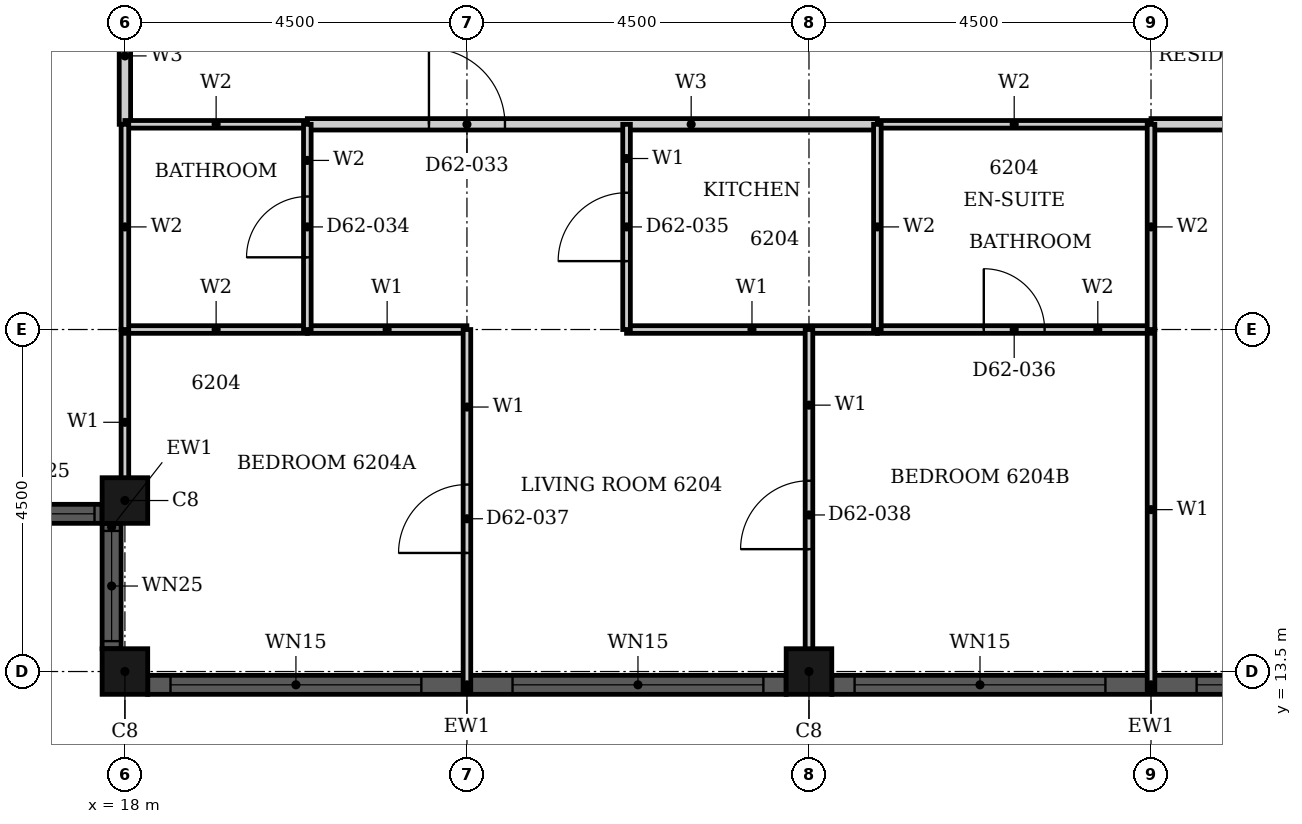
"""IFC4 building model, lengths in metres.
Left out: names, types, materials, properties, quantities, classifications, styles, units other than length and angle.
Written with IfcOpenShell. Run it as: python <this file> out.ifc"""

import sys

from ifc_helpers import new_model, si_unit, direction, frame, frame_2d, origin, origin_2d, place, context, subcontext, project, spatial, rectangle, hollow_rectangle, extrude, element, fill, save


model = new_model("IFC4")
c1 = context("Model", 3, precision=1e-05, world=origin(), true_north=direction((0.0, 1.0)))
c2 = subcontext(c1, "Body", "Model", "MODEL_VIEW")
j1 = project(units=[si_unit("LENGTHUNIT", "METRE"), si_unit("PLANEANGLEUNIT", "RADIAN")], contexts=[c1])
p1 = place(None, origin())
s1 = spatial("IfcSite", under=j1, at=p1, CompositionType="ELEMENT")
p2 = place(p1, origin())
s2 = spatial("IfcBuilding", under=s1, at=p2, CompositionType="ELEMENT")
p3 = place(p2, frame((0.0, 0.0, 245.3)))
s3 = spatial("IfcBuildingStorey", under=s2, at=p3, CompositionType="ELEMENT", Elevation=245.3)
for number, where, z_axis, x_axis in (
    (1, (18.0, 15.75, 0.0), (0.0, 0.0, 1.0), (1.0, 0.0, 0.0)),
    (2, (18.0, 13.5, 0.0), (0.0, 0.0, 1.0), (1.0, 0.0, 0.0)),
    (3, (27.0, 13.5, 0.0), (0.0, 0.0, 1.0), (1.0, 0.0, 0.0)),
):
    element("IfcColumn", number, at=place(p3, frame(where, z_axis=z_axis, x_axis=x_axis)), inside=s3, PredefinedType="COLUMN", context=c2, shape_type="SweptSolid", body=[
        extrude(hollow_rectangle(XDim=0.6, YDim=0.6, WallThickness=0.02, at=origin_2d()), origin(), (0.0, 0.0, 1.0), 3.7),
    ])
p4 = place(p3, frame((16.05, 15.575, 0.0), z_axis=(0.0, 0.0, 1.0), x_axis=(1.0, 0.0, 0.0)))
e4 = element("IfcWall", 4, at=p4, inside=s3, PredefinedType="SOLIDWALL", context=c2, shape_type="SweptSolid", body=[
    extrude(rectangle(XDim=1.65, YDim=0.25, at=frame_2d((0.825, 0.0))), origin(), (0.0, 0.0, 1.0), 3.7),
])
p5 = place(p4, frame((0.1, 0.0, 0.9)))
e5 = element("IfcOpeningElement", 5, at=p5, cuts=e4, PredefinedType="OPENING", context=c2, shape_type="SweptSolid", body=[
    extrude(rectangle(XDim=1.45, YDim=1.85, at=frame_2d((0.725, 0.925))), frame((0.0, 0.135, 0.0), z_axis=(0.0, -1.0, 0.0), x_axis=(1.0, 0.0, 0.0)), (0.0, 0.0, 1.0), 0.27),
])
p6 = place(p3, frame((17.825, 15.45, 0.0), z_axis=(0.0, 0.0, 1.0), x_axis=(0.0, -1.0, 0.0)))
e6 = element("IfcWall", 6, at=p6, inside=s3, PredefinedType="SOLIDWALL", context=c2, shape_type="SweptSolid", body=[
    extrude(rectangle(XDim=1.65, YDim=0.25, at=frame_2d((0.825, 0.0))), origin(), (0.0, 0.0, 1.0), 3.7),
])
p7 = place(p6, frame((0.1, 0.0, 0.9)))
e7 = element("IfcOpeningElement", 7, at=p7, cuts=e6, PredefinedType="OPENING", context=c2, shape_type="SweptSolid", body=[
    extrude(rectangle(XDim=1.45, YDim=1.85, at=frame_2d((0.725, 0.925))), frame((0.0, 0.135, 0.0), z_axis=(0.0, -1.0, 0.0), x_axis=(1.0, 0.0, 0.0)), (0.0, 0.0, 1.0), 0.27),
])
p8 = place(p3, frame((18.3, 13.325, 0.0), z_axis=(0.0, 0.0, 1.0), x_axis=(1.0, 0.0, 0.0)))
e8 = element("IfcWall", 8, at=p8, inside=s3, PredefinedType="SOLIDWALL", context=c2, shape_type="SweptSolid", body=[
    extrude(rectangle(XDim=8.4, YDim=0.25, at=frame_2d((4.2, 0.0))), origin(), (0.0, 0.0, 1.0), 3.7),
])
p9 = place(p8, frame((0.3, 0.0, 0.45)))
e9 = element("IfcOpeningElement", 9, at=p9, cuts=e8, PredefinedType="OPENING", context=c2, shape_type="SweptSolid", body=[
    extrude(rectangle(XDim=3.3, YDim=2.3, at=frame_2d((1.65, 1.15))), frame((0.0, 0.135, 0.0), z_axis=(0.0, -1.0, 0.0), x_axis=(1.0, 0.0, 0.0)), (0.0, 0.0, 1.0), 0.27),
])
p10 = place(p8, frame((4.8, 0.0, 0.45)))
e10 = element("IfcOpeningElement", 10, at=p10, cuts=e8, PredefinedType="OPENING", context=c2, shape_type="SweptSolid", body=[
    extrude(rectangle(XDim=3.3, YDim=2.3, at=frame_2d((1.65, 1.15))), frame((0.0, 0.135, 0.0), z_axis=(0.0, -1.0, 0.0), x_axis=(1.0, 0.0, 0.0)), (0.0, 0.0, 1.0), 0.27),
])
p11 = place(p3, frame((27.3, 13.325, 0.0), z_axis=(0.0, 0.0, 1.0), x_axis=(1.0, 0.0, 0.0)))
e11 = element("IfcWall", 11, at=p11, inside=s3, PredefinedType="SOLIDWALL", context=c2, shape_type="SweptSolid", body=[
    extrude(rectangle(XDim=8.4, YDim=0.25, at=frame_2d((4.2, 0.0))), origin(), (0.0, 0.0, 1.0), 3.7),
])
p12 = place(p11, frame((0.3, 0.0, 0.45)))
e12 = element("IfcOpeningElement", 12, at=p12, cuts=e11, PredefinedType="OPENING", context=c2, shape_type="SweptSolid", body=[
    extrude(rectangle(XDim=3.3, YDim=2.3, at=frame_2d((1.65, 1.15))), frame((0.0, 0.135, 0.0), z_axis=(0.0, -1.0, 0.0), x_axis=(1.0, 0.0, 0.0)), (0.0, 0.0, 1.0), 0.27),
])
p13 = place(p11, frame((4.8, 0.0, 0.45)))
e13 = element("IfcOpeningElement", 13, at=p13, cuts=e11, PredefinedType="OPENING", context=c2, shape_type="SweptSolid", body=[
    extrude(rectangle(XDim=3.3, YDim=2.3, at=frame_2d((1.65, 1.15))), frame((0.0, 0.135, 0.0), z_axis=(0.0, -1.0, 0.0), x_axis=(1.0, 0.0, 0.0)), (0.0, 0.0, 1.0), 0.27),
])
p14 = place(p3, frame((20.4, 20.7, 0.0), z_axis=(0.0, 0.0, 1.0), x_axis=(1.0, 0.0, 0.0)))
e14 = element("IfcWall", 14, at=p14, inside=s3, PredefinedType="PARTITIONING", context=c2, shape_type="SweptSolid", body=[
    extrude(rectangle(XDim=7.5, YDim=0.15, at=frame_2d((3.75, 0.0))), origin(), (0.0, 0.0, 1.0), 3.4),
])
p15 = place(p14, frame((1.6, 0.0, 0.0)))
e15 = element("IfcOpeningElement", 15, at=p15, cuts=e14, PredefinedType="OPENING", context=c2, shape_type="SweptSolid", body=[
    extrude(rectangle(XDim=1.0, YDim=2.2, at=frame_2d((0.5, 1.1))), frame((0.0, 0.085, 0.0), z_axis=(0.0, -1.0, 0.0), x_axis=(1.0, 0.0, 0.0)), (0.0, 0.0, 1.0), 0.17),
])
p16 = place(p3, frame((31.5, 20.7, 0.0), z_axis=(0.0, 0.0, 1.0), x_axis=(1.0, 0.0, 0.0)))
e16 = element("IfcWall", 16, at=p16, inside=s3, PredefinedType="PARTITIONING", context=c2, shape_type="SweptSolid", body=[
    extrude(rectangle(XDim=18.05, YDim=0.15, at=frame_2d((9.025, 0.0))), origin(), (0.0, 0.0, 1.0), 3.4),
])
p17 = place(p16, frame((6.25, 0.0, 0.0)))
e17 = element("IfcOpeningElement", 17, at=p17, cuts=e16, PredefinedType="OPENING", context=c2, shape_type="SweptSolid", body=[
    extrude(rectangle(XDim=1.0, YDim=2.1, at=frame_2d((0.5, 1.05))), frame((0.0, 0.085, 0.0), z_axis=(0.0, -1.0, 0.0), x_axis=(1.0, 0.0, 0.0)), (0.0, 0.0, 1.0), 0.17),
])
p18 = place(p3, frame((18.0, 20.7, 0.0), z_axis=(0.0, 0.0, 1.0), x_axis=(0.0, 1.0, 0.0)))
e18 = element("IfcWall", 18, at=p18, inside=s3, PredefinedType="PARTITIONING", context=c2, shape_type="SweptSolid", body=[
    extrude(rectangle(XDim=1.8, YDim=0.15, at=frame_2d((0.9, 0.0))), origin(), (0.0, 0.0, 1.0), 3.4),
])
p19 = place(p3, frame((20.4, 18.0, 0.0), z_axis=(0.0, 0.0, 1.0), x_axis=(1.0, 0.0, 0.0)))
e19 = element("IfcWall", 19, at=p19, inside=s3, PredefinedType="PARTITIONING", context=c2, shape_type="SweptSolid", body=[
    extrude(rectangle(XDim=2.1, YDim=0.1, at=frame_2d((1.05, 0.0))), origin(), (0.0, 0.0, 1.0), 3.4),
])
p20 = place(p3, frame((24.6, 18.0, 0.0), z_axis=(0.0, 0.0, 1.0), x_axis=(1.0, 0.0, 0.0)))
e20 = element("IfcWall", 20, at=p20, inside=s3, PredefinedType="PARTITIONING", context=c2, shape_type="SweptSolid", body=[
    extrude(rectangle(XDim=3.3, YDim=0.1, at=frame_2d((1.65, 0.0))), origin(), (0.0, 0.0, 1.0), 3.4),
])
p21 = place(p3, frame((18.0, 15.56, 0.0), z_axis=(0.0, 0.0, 1.0), x_axis=(0.0, 1.0, 0.0)))
e21 = element("IfcWall", 21, at=p21, inside=s3, PredefinedType="PARTITIONING", context=c2, shape_type="SweptSolid", body=[
    extrude(rectangle(XDim=2.439, YDim=0.1, at=frame_2d((1.219, 0.0))), origin(), (0.0, 0.0, 1.0), 3.4),
])
p22 = place(p3, frame((22.5, 13.26, 0.0), z_axis=(0.0, 0.0, 1.0), x_axis=(0.0, 1.0, 0.0)))
e22 = element("IfcWall", 22, at=p22, inside=s3, PredefinedType="PARTITIONING", context=c2, shape_type="SweptSolid", body=[
    extrude(rectangle(XDim=4.74, YDim=0.1, at=frame_2d((2.37, 0.0))), origin(), (0.0, 0.0, 1.0), 3.4),
])
p23 = place(p22, frame((1.8, 0.0, 0.0)))
e23 = element("IfcOpeningElement", 23, at=p23, cuts=e22, PredefinedType="OPENING", context=c2, shape_type="SweptSolid", body=[
    extrude(rectangle(XDim=0.9, YDim=2.1, at=frame_2d((0.45, 1.05))), frame((0.0, 0.06, 0.0), z_axis=(0.0, -1.0, 0.0), x_axis=(1.0, 0.0, 0.0)), (0.0, 0.0, 1.0), 0.12),
])
p24 = place(p3, frame((24.6, 18.0, 0.0), z_axis=(0.0, 0.0, 1.0), x_axis=(0.0, 1.0, 0.0)))
e24 = element("IfcWall", 24, at=p24, inside=s3, PredefinedType="PARTITIONING", context=c2, shape_type="SweptSolid", body=[
    extrude(rectangle(XDim=2.7, YDim=0.1, at=frame_2d((1.35, 0.0))), origin(), (0.0, 0.0, 1.0), 3.4),
])
p25 = place(p24, frame((0.9, 0.0, 0.0)))
e25 = element("IfcOpeningElement", 25, at=p25, cuts=e24, PredefinedType="OPENING", context=c2, shape_type="SweptSolid", body=[
    extrude(rectangle(XDim=0.9, YDim=2.1, at=frame_2d((0.45, 1.05))), frame((0.0, 0.06, 0.0), z_axis=(0.0, -1.0, 0.0), x_axis=(1.0, 0.0, 0.0)), (0.0, 0.0, 1.0), 0.12),
])
p26 = place(p3, frame((27.0, 13.31, 0.0), z_axis=(0.0, 0.0, 1.0), x_axis=(0.0, 1.0, 0.0)))
e26 = element("IfcWall", 26, at=p26, inside=s3, PredefinedType="PARTITIONING", context=c2, shape_type="SweptSolid", body=[
    extrude(rectangle(XDim=4.69, YDim=0.1, at=frame_2d((2.345, 0.0))), origin(), (0.0, 0.0, 1.0), 3.4),
])
p27 = place(p26, frame((1.8, 0.0, 0.0)))
e27 = element("IfcOpeningElement", 27, at=p27, cuts=e26, PredefinedType="OPENING", context=c2, shape_type="SweptSolid", body=[
    extrude(rectangle(XDim=0.9, YDim=2.1, at=frame_2d((0.45, 1.05))), frame((0.0, 0.06, 0.0), z_axis=(0.0, -1.0, 0.0), x_axis=(1.0, 0.0, 0.0)), (0.0, 0.0, 1.0), 0.12),
])
p28 = place(p3, frame((31.5, 13.26, 0.0), z_axis=(0.0, 0.0, 1.0), x_axis=(0.0, 1.0, 0.0)))
e28 = element("IfcWall", 28, at=p28, inside=s3, PredefinedType="PARTITIONING", context=c2, shape_type="SweptSolid", body=[
    extrude(rectangle(XDim=4.74, YDim=0.1, at=frame_2d((2.37, 0.0))), origin(), (0.0, 0.0, 1.0), 3.4),
])
p29 = place(p3, frame((18.0, 18.0, 0.0), z_axis=(0.0, 0.0, 1.0), x_axis=(1.0, 0.0, 0.0)))
e29 = element("IfcWall", 29, at=p29, inside=s3, PredefinedType="PARTITIONING", context=c2, shape_type="SweptSolid", body=[
    extrude(rectangle(XDim=2.4, YDim=0.1, at=frame_2d((1.2, 0.0))), origin(), (0.0, 0.0, 1.0), 3.4),
])
p30 = place(p3, frame((27.9, 18.0, 0.0), z_axis=(0.0, 0.0, 1.0), x_axis=(1.0, 0.0, 0.0)))
e30 = element("IfcWall", 30, at=p30, inside=s3, PredefinedType="PARTITIONING", context=c2, shape_type="SweptSolid", body=[
    extrude(rectangle(XDim=3.6, YDim=0.1, at=frame_2d((1.8, 0.0))), origin(), (0.0, 0.0, 1.0), 3.4),
])
p31 = place(p30, frame((1.4, 0.0, 0.0)))
e31 = element("IfcOpeningElement", 31, at=p31, cuts=e30, PredefinedType="OPENING", context=c2, shape_type="SweptSolid", body=[
    extrude(rectangle(XDim=0.8, YDim=2.1, at=frame_2d((0.4, 1.05))), frame((0.0, 0.06, 0.0), z_axis=(0.0, -1.0, 0.0), x_axis=(1.0, 0.0, 0.0)), (0.0, 0.0, 1.0), 0.12),
])
p32 = place(p3, frame((18.0, 20.7, 0.0), z_axis=(0.0, 0.0, 1.0), x_axis=(1.0, 0.0, 0.0)))
e32 = element("IfcWall", 32, at=p32, inside=s3, PredefinedType="PARTITIONING", context=c2, shape_type="SweptSolid", body=[
    extrude(rectangle(XDim=2.4, YDim=0.1, at=frame_2d((1.2, 0.0))), origin(), (0.0, 0.0, 1.0), 3.4),
])
p33 = place(p3, frame((27.9, 20.7, 0.0), z_axis=(0.0, 0.0, 1.0), x_axis=(1.0, 0.0, 0.0)))
e33 = element("IfcWall", 33, at=p33, inside=s3, PredefinedType="PARTITIONING", context=c2, shape_type="SweptSolid", body=[
    extrude(rectangle(XDim=3.6, YDim=0.1, at=frame_2d((1.8, 0.0))), origin(), (0.0, 0.0, 1.0), 3.4),
])
p34 = place(p3, frame((18.0, 18.0, 0.0), z_axis=(0.0, 0.0, 1.0), x_axis=(0.0, 1.0, 0.0)))
e34 = element("IfcWall", 34, at=p34, inside=s3, PredefinedType="PARTITIONING", context=c2, shape_type="SweptSolid", body=[
    extrude(rectangle(XDim=2.7, YDim=0.1, at=frame_2d((1.35, 0.0))), origin(), (0.0, 0.0, 1.0), 3.4),
])
p35 = place(p3, frame((20.4, 18.0, 0.0), z_axis=(0.0, 0.0, 1.0), x_axis=(0.0, 1.0, 0.0)))
e35 = element("IfcWall", 35, at=p35, inside=s3, PredefinedType="PARTITIONING", context=c2, shape_type="SweptSolid", body=[
    extrude(rectangle(XDim=2.7, YDim=0.1, at=frame_2d((1.35, 0.0))), origin(), (0.0, 0.0, 1.0), 3.4),
])
p36 = place(p35, frame((0.95, 0.0, 0.0)))
e36 = element("IfcOpeningElement", 36, at=p36, cuts=e35, PredefinedType="OPENING", context=c2, shape_type="SweptSolid", body=[
    extrude(rectangle(XDim=0.8, YDim=2.1, at=frame_2d((0.4, 1.05))), frame((0.0, 0.06, 0.0), z_axis=(0.0, -1.0, 0.0), x_axis=(1.0, 0.0, 0.0)), (0.0, 0.0, 1.0), 0.12),
])
for number, where, z_axis, x_axis in (
    (37, (27.9, 18.0, 0.0), (0.0, 0.0, 1.0), (0.0, 1.0, 0.0)),
    (38, (31.5, 18.0, 0.0), (0.0, 0.0, 1.0), (0.0, 1.0, 0.0)),
):
    element("IfcWall", number, at=place(p3, frame(where, z_axis=z_axis, x_axis=x_axis)), inside=s3, PredefinedType="PARTITIONING", context=c2, shape_type="SweptSolid", body=[
        extrude(rectangle(XDim=2.7, YDim=0.1, at=frame_2d((1.35, 0.0))), origin(), (0.0, 0.0, 1.0), 3.4),
    ])
p37 = place(p5, origin())
e39 = element("IfcWindow", 39, at=p37, inside=s3, PartitioningType="SINGLE_PANEL", PredefinedType="WINDOW", context=c2, shape_type="SweptSolid", body=[
    extrude(rectangle(XDim=1.45, YDim=1.85, at=frame_2d((0.725, 0.925))), frame((0.0, 0.03, 0.0), z_axis=(0.0, -1.0, 0.0), x_axis=(1.0, 0.0, 0.0)), (0.0, 0.0, 1.0), 0.06),
])
fill(e5, e39)
p38 = place(p7, origin())
e40 = element("IfcWindow", 40, at=p38, inside=s3, PartitioningType="SINGLE_PANEL", PredefinedType="WINDOW", context=c2, shape_type="SweptSolid", body=[
    extrude(rectangle(XDim=1.45, YDim=1.85, at=frame_2d((0.725, 0.925))), frame((0.0, 0.03, 0.0), z_axis=(0.0, -1.0, 0.0), x_axis=(1.0, 0.0, 0.0)), (0.0, 0.0, 1.0), 0.06),
])
fill(e7, e40)
p39 = place(p9, origin())
e41 = element("IfcWindow", 41, at=p39, inside=s3, PartitioningType="SINGLE_PANEL", PredefinedType="WINDOW", context=c2, shape_type="SweptSolid", body=[
    extrude(rectangle(XDim=3.3, YDim=2.3, at=frame_2d((1.65, 1.15))), frame((0.0, 0.03, 0.0), z_axis=(0.0, -1.0, 0.0), x_axis=(1.0, 0.0, 0.0)), (0.0, 0.0, 1.0), 0.06),
])
fill(e9, e41)
p40 = place(p10, origin())
e42 = element("IfcWindow", 42, at=p40, inside=s3, PartitioningType="SINGLE_PANEL", PredefinedType="WINDOW", context=c2, shape_type="SweptSolid", body=[
    extrude(rectangle(XDim=3.3, YDim=2.3, at=frame_2d((1.65, 1.15))), frame((0.0, 0.03, 0.0), z_axis=(0.0, -1.0, 0.0), x_axis=(1.0, 0.0, 0.0)), (0.0, 0.0, 1.0), 0.06),
])
fill(e10, e42)
p41 = place(p12, origin())
e43 = element("IfcWindow", 43, at=p41, inside=s3, PartitioningType="SINGLE_PANEL", PredefinedType="WINDOW", context=c2, shape_type="SweptSolid", body=[
    extrude(rectangle(XDim=3.3, YDim=2.3, at=frame_2d((1.65, 1.15))), frame((0.0, 0.03, 0.0), z_axis=(0.0, -1.0, 0.0), x_axis=(1.0, 0.0, 0.0)), (0.0, 0.0, 1.0), 0.06),
])
fill(e12, e43)
p42 = place(p13, origin())
e44 = element("IfcWindow", 44, at=p42, inside=s3, PartitioningType="SINGLE_PANEL", PredefinedType="WINDOW", context=c2, shape_type="SweptSolid", body=[
    extrude(rectangle(XDim=3.3, YDim=2.3, at=frame_2d((1.65, 1.15))), frame((0.0, 0.03, 0.0), z_axis=(0.0, -1.0, 0.0), x_axis=(1.0, 0.0, 0.0)), (0.0, 0.0, 1.0), 0.06),
])
fill(e13, e44)
p43 = place(p15, origin())
e45 = element("IfcDoor", 45, at=p43, inside=s3, OperationType="SINGLE_SWING_RIGHT", PredefinedType="DOOR", context=c2, shape_type="SweptSolid", body=[
    extrude(rectangle(XDim=1.0, YDim=2.2, at=frame_2d((0.5, 1.1))), frame((0.0, 0.025, 0.0), z_axis=(0.0, -1.0, 0.0), x_axis=(1.0, 0.0, 0.0)), (0.0, 0.0, 1.0), 0.05),
])
fill(e15, e45)
p44 = place(p36, origin())
e46 = element("IfcDoor", 46, at=p44, inside=s3, OperationType="SINGLE_SWING_LEFT", PredefinedType="DOOR", context=c2, shape_type="SweptSolid", body=[
    extrude(rectangle(XDim=0.8, YDim=2.1, at=frame_2d((0.4, 1.05))), frame((0.0, 0.025, 0.0), z_axis=(0.0, -1.0, 0.0), x_axis=(1.0, 0.0, 0.0)), (0.0, 0.0, 1.0), 0.05),
])
fill(e36, e46)
p45 = place(p25, origin())
e47 = element("IfcDoor", 47, at=p45, inside=s3, OperationType="SINGLE_SWING_LEFT", PredefinedType="DOOR", context=c2, shape_type="SweptSolid", body=[
    extrude(rectangle(XDim=0.9, YDim=2.1, at=frame_2d((0.45, 1.05))), frame((0.0, 0.025, 0.0), z_axis=(0.0, -1.0, 0.0), x_axis=(1.0, 0.0, 0.0)), (0.0, 0.0, 1.0), 0.05),
])
fill(e25, e47)
p46 = place(p31, origin())
e48 = element("IfcDoor", 48, at=p46, inside=s3, OperationType="SINGLE_SWING_RIGHT", PredefinedType="DOOR", context=c2, shape_type="SweptSolid", body=[
    extrude(rectangle(XDim=0.8, YDim=2.1, at=frame_2d((0.4, 1.05))), frame((0.0, 0.025, 0.0), z_axis=(0.0, -1.0, 0.0), x_axis=(1.0, 0.0, 0.0)), (0.0, 0.0, 1.0), 0.05),
])
fill(e31, e48)
p47 = place(p23, origin())
e49 = element("IfcDoor", 49, at=p47, inside=s3, OperationType="SINGLE_SWING_RIGHT", PredefinedType="DOOR", context=c2, shape_type="SweptSolid", body=[
    extrude(rectangle(XDim=0.9, YDim=2.1, at=frame_2d((0.45, 1.05))), frame((0.0, 0.025, 0.0), z_axis=(0.0, -1.0, 0.0), x_axis=(1.0, 0.0, 0.0)), (0.0, 0.0, 1.0), 0.05),
])
fill(e23, e49)
p48 = place(p27, origin())
e50 = element("IfcDoor", 50, at=p48, inside=s3, OperationType="SINGLE_SWING_LEFT", PredefinedType="DOOR", context=c2, shape_type="SweptSolid", body=[
    extrude(rectangle(XDim=0.9, YDim=2.1, at=frame_2d((0.45, 1.05))), frame((0.0, 0.025, 0.0), z_axis=(0.0, -1.0, 0.0), x_axis=(1.0, 0.0, 0.0)), (0.0, 0.0, 1.0), 0.05),
])
fill(e27, e50)
save(model, sys.argv[1])
